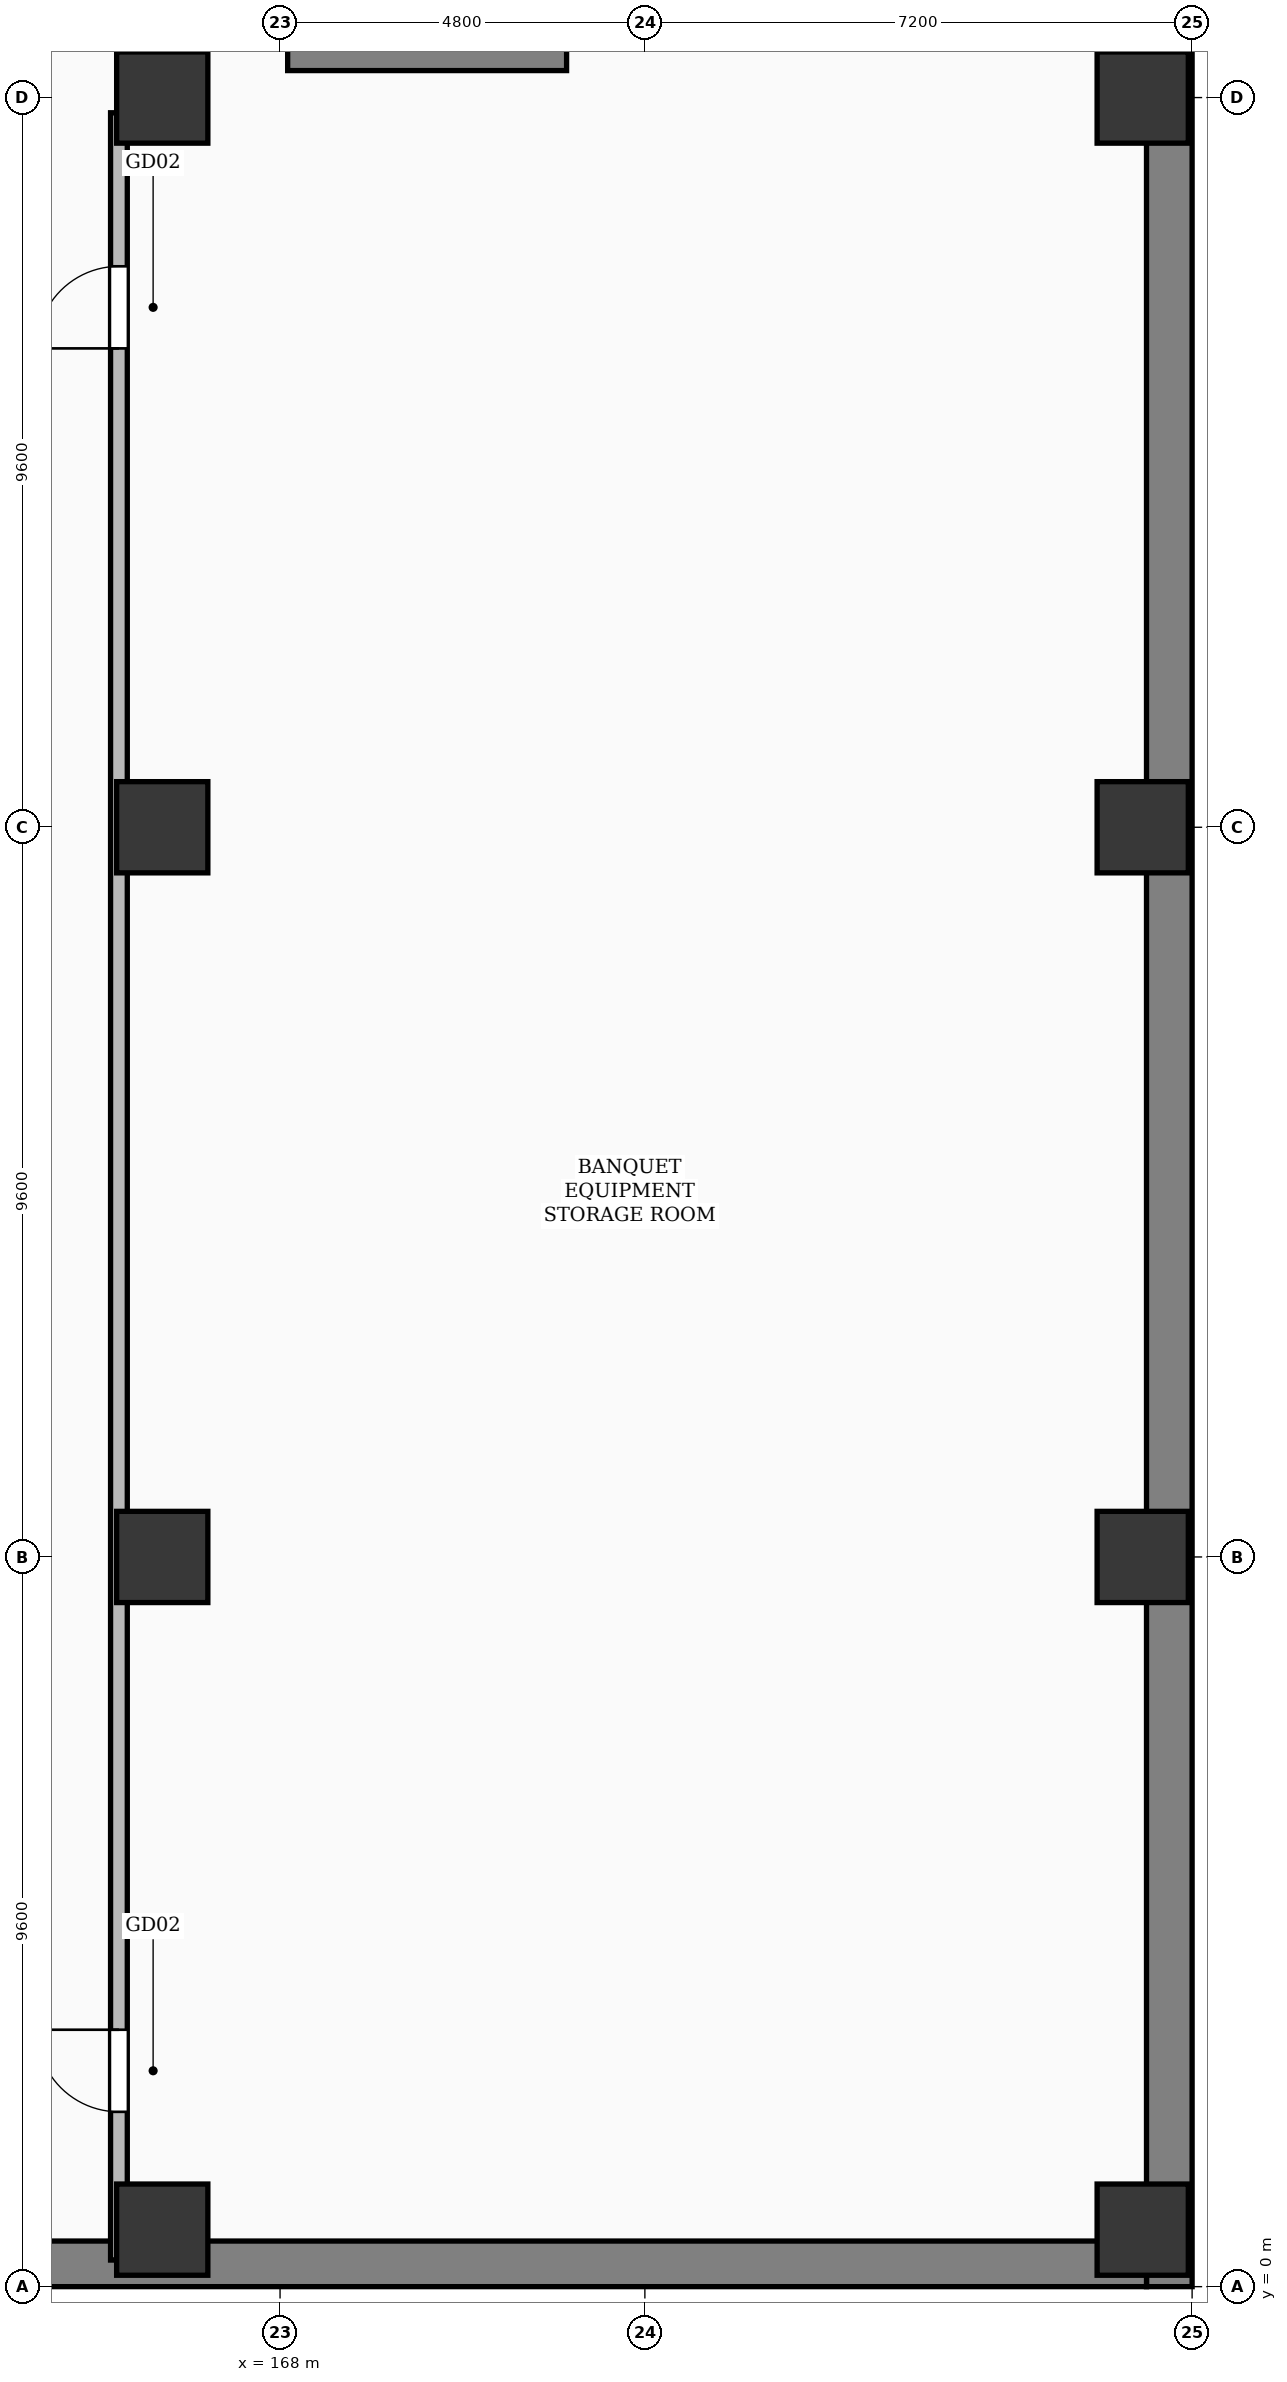
"""IFC4 building model, lengths in metres.
Left out: names, types, materials, properties, quantities, classifications, styles, units other than length and angle.
Written with IfcOpenShell. Run it as: python <this file> out.ifc"""

import sys

from ifc_helpers import new_model, si_unit, direction, frame, frame_2d, origin, origin_2d, place, context, subcontext, project, spatial, rectangle, extrude, element, fill, save


model = new_model("IFC4")
c1 = context("Model", 3, precision=1e-05, world=origin(), true_north=direction((0.0, 1.0)))
c2 = subcontext(c1, "Body", "Model", "MODEL_VIEW")
j1 = project(units=[si_unit("LENGTHUNIT", "METRE"), si_unit("PLANEANGLEUNIT", "RADIAN")], contexts=[c1])
p1 = place(None, origin())
s1 = spatial("IfcSite", under=j1, at=p1, CompositionType="ELEMENT")
p2 = place(p1, origin())
s2 = spatial("IfcBuilding", under=s1, at=p2, CompositionType="ELEMENT")
p3 = place(p2, frame((0.0, 0.0, -8.4)))
s3 = spatial("IfcBuildingStorey", under=s2, at=p3, CompositionType="ELEMENT", Elevation=-8.4)
for number, where, z_axis, x_axis in (
    (1, (166.45, 0.75, 0.0), (0.0, 0.0, 1.0), (1.0, 0.0, 0.0)),
    (2, (166.45, 9.6, 0.0), (0.0, 0.0, 1.0), (1.0, 0.0, 0.0)),
    (3, (166.45, 19.2, 0.0), (0.0, 0.0, 1.0), (1.0, 0.0, 0.0)),
    (4, (166.45, 28.8, 0.0), (0.0, 0.0, 1.0), (1.0, 0.0, 0.0)),
    (5, (179.35, 0.75, 0.0), (0.0, 0.0, 1.0), (1.0, 0.0, 0.0)),
    (6, (179.35, 9.6, 0.0), (0.0, 0.0, 1.0), (1.0, 0.0, 0.0)),
    (7, (179.35, 19.2, 0.0), (0.0, 0.0, 1.0), (1.0, 0.0, 0.0)),
    (8, (179.35, 28.8, 0.0), (0.0, 0.0, 1.0), (1.0, 0.0, 0.0)),
):
    element("IfcColumn", number, at=place(p3, frame(where, z_axis=z_axis, x_axis=x_axis)), inside=s3, PredefinedType="COLUMN", context=c2, shape_type="SweptSolid", body=[
        extrude(rectangle(XDim=1.2, YDim=1.2, at=origin_2d()), origin(), (0.0, 0.0, 1.0), 4.2),
    ])
p4 = place(p3, frame((179.7, 126.0, 0.0), z_axis=(0.0, 0.0, 1.0), x_axis=(0.0, -1.0, 0.0)))
e9 = element("IfcWall", 9, at=p4, inside=s3, PredefinedType="USERDEFINED", context=c2, shape_type="SweptSolid", body=[
    extrude(rectangle(XDim=126.0, YDim=0.6, at=frame_2d((63.0, 0.0))), origin(), (0.0, 0.0, 1.0), 3.86),
])
p5 = place(p3, frame((179.4, 0.3, 0.0), z_axis=(0.0, 0.0, 1.0), x_axis=(-1.0, 0.0, 0.0)))
e10 = element("IfcWall", 10, at=p5, inside=s3, PredefinedType="USERDEFINED", context=c2, shape_type="SweptSolid", body=[
    extrude(rectangle(XDim=121.2, YDim=0.6, at=frame_2d((60.6, 0.0))), origin(), (0.0, 0.0, 1.0), 3.86),
])
p6 = place(p3, frame((168.1, 29.38, 0.0), z_axis=(0.0, 0.0, 1.0), x_axis=(1.0, 0.0, 0.0)))
e11 = element("IfcWall", 11, at=p6, inside=s3, PredefinedType="SHEAR", context=c2, shape_type="SweptSolid", body=[
    extrude(rectangle(XDim=3.67, YDim=0.45, at=frame_2d((1.835, 0.0))), origin(), (0.0, 0.0, 1.0), 3.86),
])
p7 = place(p3, frame((165.88, 0.35, 0.0), z_axis=(0.0, 0.0, 1.0), x_axis=(0.0, 1.0, 0.0)))
e12 = element("IfcWall", 12, at=p7, inside=s3, PredefinedType="PARTITIONING", context=c2, shape_type="SweptSolid", body=[
    extrude(rectangle(XDim=28.25, YDim=0.22, at=frame_2d((14.125, 0.0))), origin(), (0.0, 0.0, 1.0), 2.972),
])
p8 = place(p7, frame((1.95, 0.0, 0.0)))
e13 = element("IfcOpeningElement", 13, at=p8, cuts=e12, PredefinedType="OPENING", context=c2, shape_type="SweptSolid", body=[
    extrude(rectangle(XDim=1.08, YDim=2.25, at=frame_2d((0.54, 1.125))), frame((0.0, 0.122, 0.0), z_axis=(0.0, -1.0, 0.0), x_axis=(1.0, 0.0, 0.0)), (0.0, 0.0, 1.0), 0.244),
])
p9 = place(p7, frame((25.15, 0.0, 0.0)))
e14 = element("IfcOpeningElement", 14, at=p9, cuts=e12, PredefinedType="OPENING", context=c2, shape_type="SweptSolid", body=[
    extrude(rectangle(XDim=1.08, YDim=2.25, at=frame_2d((0.54, 1.125))), frame((0.0, 0.122, 0.0), z_axis=(0.0, -1.0, 0.0), x_axis=(1.0, 0.0, 0.0)), (0.0, 0.0, 1.0), 0.244),
])
p10 = place(p8, origin())
e15 = element("IfcDoor", 15, at=p10, inside=s3, OperationType="SINGLE_SWING_RIGHT", PredefinedType="DOOR", context=c2, shape_type="SweptSolid", body=[
    extrude(rectangle(XDim=1.08, YDim=2.25, at=frame_2d((0.54, 1.125))), frame((0.0, 0.025, 0.0), z_axis=(0.0, -1.0, 0.0), x_axis=(1.0, 0.0, 0.0)), (0.0, 0.0, 1.0), 0.05),
])
fill(e13, e15)
p11 = place(p9, origin())
e16 = element("IfcDoor", 16, at=p11, inside=s3, OperationType="SINGLE_SWING_LEFT", PredefinedType="DOOR", context=c2, shape_type="SweptSolid", body=[
    extrude(rectangle(XDim=1.08, YDim=2.25, at=frame_2d((0.54, 1.125))), frame((0.0, 0.025, 0.0), z_axis=(0.0, -1.0, 0.0), x_axis=(1.0, 0.0, 0.0)), (0.0, 0.0, 1.0), 0.05),
])
fill(e14, e16)
save(model, sys.argv[1])
